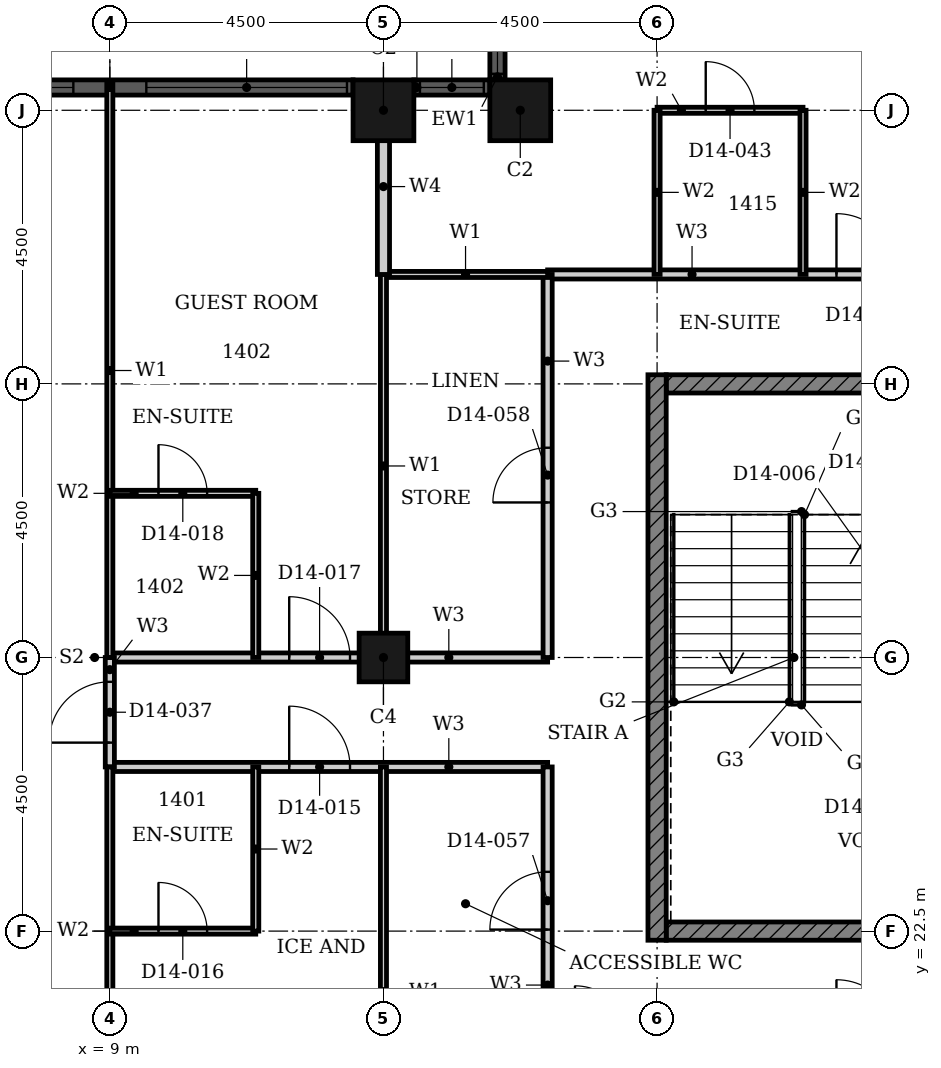
"""IFC4 building model, lengths in metres.
Left out: names, types, materials, properties, quantities, classifications, styles, units other than length and angle.
Written with IfcOpenShell. Run it as: python <this file> out.ifc"""

import sys

from ifc_helpers import new_model, si_unit, direction, frame, frame_2d, origin, origin_2d, place, context, subcontext, project, spatial, rectangle, hollow_rectangle, extrude, element, fill, save


model = new_model("IFC4")
c1 = context("Model", 3, precision=1e-05, world=origin(), true_north=direction((0.0, 1.0)))
c2 = subcontext(c1, "Body", "Model", "MODEL_VIEW")
j1 = project(units=[si_unit("LENGTHUNIT", "METRE"), si_unit("PLANEANGLEUNIT", "RADIAN")], contexts=[c1])
p1 = place(None, origin())
s1 = spatial("IfcSite", under=j1, at=p1, CompositionType="ELEMENT")
p2 = place(p1, origin())
s2 = spatial("IfcBuilding", under=s1, at=p2, CompositionType="ELEMENT")
p3 = place(p2, frame((0.0, 0.0, 63.6)))
s3 = spatial("IfcBuildingStorey", under=s2, at=p3, CompositionType="ELEMENT", Elevation=63.6)
for number, where, z_axis, x_axis in (
    (1, (15.75, 36.0, 0.0), (0.0, 0.0, 1.0), (1.0, 0.0, 0.0)),
    (2, (13.5, 36.0, 0.0), (0.0, 0.0, 1.0), (1.0, 0.0, 0.0)),
):
    element("IfcColumn", number, at=place(p3, frame(where, z_axis=z_axis, x_axis=x_axis)), inside=s3, PredefinedType="COLUMN", context=c2, shape_type="SweptSolid", body=[
        extrude(hollow_rectangle(XDim=1.0, YDim=1.0, WallThickness=0.032, at=origin_2d()), origin(), (0.0, 0.0, 1.0), 3.6),
    ])
p4 = place(p3, frame((13.5, 27.0, 0.0), z_axis=(0.0, 0.0, 1.0), x_axis=(1.0, 0.0, 0.0)))
e3 = element("IfcColumn", 3, at=p4, inside=s3, PredefinedType="COLUMN", context=c2, shape_type="SweptSolid", body=[
    extrude(hollow_rectangle(XDim=0.8, YDim=0.8, WallThickness=0.025, at=origin_2d()), origin(), (0.0, 0.0, 1.0), 3.6),
])
p5 = place(p3, frame((15.375, 37.75, 0.0), z_axis=(0.0, 0.0, 1.0), x_axis=(0.0, -1.0, 0.0)))
e4 = element("IfcWall", 4, at=p5, inside=s3, PredefinedType="SOLIDWALL", context=c2, shape_type="SweptSolid", body=[
    extrude(rectangle(XDim=1.25, YDim=0.25, at=frame_2d((0.625, 0.0))), origin(), (0.0, 0.0, 1.0), 3.6),
])
p6 = place(p5, frame((0.1, 0.0, 0.9)))
e5 = element("IfcOpeningElement", 5, at=p6, cuts=e4, PredefinedType="OPENING", context=c2, shape_type="SweptSolid", body=[
    extrude(rectangle(XDim=1.05, YDim=2.08, at=frame_2d((0.525, 1.04))), frame((0.0, 0.135, 0.0), z_axis=(0.0, -1.0, 0.0), x_axis=(1.0, 0.0, 0.0)), (0.0, 0.0, 1.0), 0.27),
])
p7 = place(p3, frame((15.25, 36.375, 0.0), z_axis=(0.0, 0.0, 1.0), x_axis=(-1.0, 0.0, 0.0)))
e6 = element("IfcWall", 6, at=p7, inside=s3, PredefinedType="SOLIDWALL", context=c2, shape_type="SweptSolid", body=[
    extrude(rectangle(XDim=1.25, YDim=0.25, at=frame_2d((0.625, 0.0))), origin(), (0.0, 0.0, 1.0), 3.6),
])
p8 = place(p7, frame((0.1, 0.0, 0.9)))
e7 = element("IfcOpeningElement", 7, at=p8, cuts=e6, PredefinedType="OPENING", context=c2, shape_type="SweptSolid", body=[
    extrude(rectangle(XDim=1.05, YDim=2.08, at=frame_2d((0.525, 1.04))), frame((0.0, 0.135, 0.0), z_axis=(0.0, -1.0, 0.0), x_axis=(1.0, 0.0, 0.0)), (0.0, 0.0, 1.0), 0.27),
])
p9 = place(p3, frame((13.0, 36.375, 0.0), z_axis=(0.0, 0.0, 1.0), x_axis=(-1.0, 0.0, 0.0)))
e8 = element("IfcWall", 8, at=p9, inside=s3, PredefinedType="SOLIDWALL", context=c2, shape_type="SweptSolid", body=[
    extrude(rectangle(XDim=8.0, YDim=0.25, at=frame_2d((4.0, 0.0))), origin(), (0.0, 0.0, 1.0), 3.6),
])
p10 = place(p9, frame((0.1, 0.0, 0.9)))
e9 = element("IfcOpeningElement", 9, at=p10, cuts=e8, PredefinedType="OPENING", context=c2, shape_type="SweptSolid", body=[
    extrude(rectangle(XDim=3.3, YDim=2.08, at=frame_2d((1.65, 1.04))), frame((0.0, 0.135, 0.0), z_axis=(0.0, -1.0, 0.0), x_axis=(1.0, 0.0, 0.0)), (0.0, 0.0, 1.0), 0.27),
])
p11 = place(p9, frame((4.6, 0.0, 0.9)))
e10 = element("IfcOpeningElement", 10, at=p11, cuts=e8, PredefinedType="OPENING", context=c2, shape_type="SweptSolid", body=[
    extrude(rectangle(XDim=3.3, YDim=2.08, at=frame_2d((1.65, 1.04))), frame((0.0, 0.135, 0.0), z_axis=(0.0, -1.0, 0.0), x_axis=(1.0, 0.0, 0.0)), (0.0, 0.0, 1.0), 0.27),
])
p12 = place(p3, frame((18.15, 22.5, 0.0), z_axis=(0.0, 0.0, 1.0), x_axis=(1.0, 0.0, 0.0)))
e11 = element("IfcWall", 11, at=p12, inside=s3, PredefinedType="SHEAR", context=c2, shape_type="SweptSolid", body=[
    extrude(rectangle(XDim=4.225, YDim=0.3, at=frame_2d((2.113, 0.0))), origin(), (0.0, 0.0, 1.0), 3.3),
])
p13 = place(p3, frame((18.15, 31.5, 0.0), z_axis=(0.0, 0.0, 1.0), x_axis=(1.0, 0.0, 0.0)))
e12 = element("IfcWall", 12, at=p13, inside=s3, PredefinedType="SHEAR", context=c2, shape_type="SweptSolid", body=[
    extrude(rectangle(XDim=6.797, YDim=0.3, at=frame_2d((3.398, 0.0))), origin(), (0.0, 0.0, 1.0), 3.3),
])
p14 = place(p13, frame((4.736, 0.0, 0.0)))
e13 = element("IfcOpeningElement", 13, at=p14, cuts=e12, PredefinedType="OPENING", context=c2, shape_type="SweptSolid", body=[
    extrude(rectangle(XDim=1.8, YDim=2.1, at=frame_2d((0.9, 1.05))), frame((0.0, 0.16, 0.0), z_axis=(0.0, -1.0, 0.0), x_axis=(1.0, 0.0, 0.0)), (0.0, 0.0, 1.0), 0.32),
])
p15 = place(p3, frame((18.0, 22.35, 0.0), z_axis=(0.0, 0.0, 1.0), x_axis=(0.0, 1.0, 0.0)))
e14 = element("IfcWall", 14, at=p15, inside=s3, PredefinedType="SHEAR", context=c2, shape_type="SweptSolid", body=[
    extrude(rectangle(XDim=9.3, YDim=0.3, at=frame_2d((4.65, 0.0))), origin(), (0.0, 0.0, 1.0), 3.3),
])
p16 = place(p3, frame((9.0, 25.2, 0.0), z_axis=(0.0, 0.0, 1.0), x_axis=(1.0, 0.0, 0.0)))
e15 = element("IfcWall", 15, at=p16, inside=s3, PredefinedType="PARTITIONING", context=c2, shape_type="SweptSolid", body=[
    extrude(rectangle(XDim=7.2, YDim=0.15, at=frame_2d((3.6, 0.0))), origin(), (0.0, 0.0, 1.0), 3.3),
])
p17 = place(p16, frame((2.95, 0.0, 0.0)))
e16 = element("IfcOpeningElement", 16, at=p17, cuts=e15, PredefinedType="OPENING", context=c2, shape_type="SweptSolid", body=[
    extrude(rectangle(XDim=1.0, YDim=2.1, at=frame_2d((0.5, 1.05))), frame((0.0, 0.085, 0.0), z_axis=(0.0, -1.0, 0.0), x_axis=(1.0, 0.0, 0.0)), (0.0, 0.0, 1.0), 0.17),
])
p18 = place(p3, frame((9.0, 27.0, 0.0), z_axis=(0.0, 0.0, 1.0), x_axis=(1.0, 0.0, 0.0)))
e17 = element("IfcWall", 17, at=p18, inside=s3, PredefinedType="PARTITIONING", context=c2, shape_type="SweptSolid", body=[
    extrude(rectangle(XDim=7.2, YDim=0.15, at=frame_2d((3.6, 0.0))), origin(), (0.0, 0.0, 1.0), 2.58),
])
p19 = place(p18, frame((2.95, 0.0, 0.0)))
e18 = element("IfcOpeningElement", 18, at=p19, cuts=e17, PredefinedType="OPENING", context=c2, shape_type="SweptSolid", body=[
    extrude(rectangle(XDim=1.0, YDim=2.1, at=frame_2d((0.5, 1.05))), frame((0.0, 0.085, 0.0), z_axis=(0.0, -1.0, 0.0), x_axis=(1.0, 0.0, 0.0)), (0.0, 0.0, 1.0), 0.17),
])
p20 = place(p3, frame((16.2, 33.3, 0.0), z_axis=(0.0, 0.0, 1.0), x_axis=(1.0, 0.0, 0.0)))
e19 = element("IfcWall", 19, at=p20, inside=s3, PredefinedType="PARTITIONING", context=c2, shape_type="SweptSolid", body=[
    extrude(rectangle(XDim=9.9, YDim=0.15, at=frame_2d((4.95, 0.0))), origin(), (0.0, 0.0, 1.0), 3.3),
])
p21 = place(p20, frame((4.75, 0.0, 0.0)))
e20 = element("IfcOpeningElement", 20, at=p21, cuts=e19, PredefinedType="OPENING", context=c2, shape_type="SweptSolid", body=[
    extrude(rectangle(XDim=1.0, YDim=2.1, at=frame_2d((0.5, 1.05))), frame((0.0, 0.085, 0.0), z_axis=(0.0, -1.0, 0.0), x_axis=(1.0, 0.0, 0.0)), (0.0, 0.0, 1.0), 0.17),
])
p22 = place(p20, frame((7.65, 0.0, 0.0)))
e21 = element("IfcOpeningElement", 21, at=p22, cuts=e19, PredefinedType="OPENING", context=c2, shape_type="SweptSolid", body=[
    extrude(rectangle(XDim=0.9, YDim=2.1, at=frame_2d((0.45, 1.05))), frame((0.0, 0.085, 0.0), z_axis=(0.0, -1.0, 0.0), x_axis=(1.0, 0.0, 0.0)), (0.0, 0.0, 1.0), 0.17),
])
p23 = place(p3, frame((16.2, 27.0, 0.0), z_axis=(0.0, 0.0, 1.0), x_axis=(0.0, 1.0, 0.0)))
e22 = element("IfcWall", 22, at=p23, inside=s3, PredefinedType="PARTITIONING", context=c2, shape_type="SweptSolid", body=[
    extrude(rectangle(XDim=6.3, YDim=0.15, at=frame_2d((3.15, 0.0))), origin(), (0.0, 0.0, 1.0), 3.3),
])
p24 = place(p23, frame((2.55, 0.0, 0.0)))
e23 = element("IfcOpeningElement", 23, at=p24, cuts=e22, PredefinedType="OPENING", context=c2, shape_type="SweptSolid", body=[
    extrude(rectangle(XDim=0.9, YDim=2.1, at=frame_2d((0.45, 1.05))), frame((0.0, 0.085, 0.0), z_axis=(0.0, -1.0, 0.0), x_axis=(1.0, 0.0, 0.0)), (0.0, 0.0, 1.0), 0.17),
])
p25 = place(p3, frame((16.2, 20.7, 0.0), z_axis=(0.0, 0.0, 1.0), x_axis=(0.0, 1.0, 0.0)))
e24 = element("IfcWall", 24, at=p25, inside=s3, PredefinedType="PARTITIONING", context=c2, shape_type="SweptSolid", body=[
    extrude(rectangle(XDim=4.5, YDim=0.15, at=frame_2d((2.25, 0.0))), origin(), (0.0, 0.0, 1.0), 3.3),
])
p26 = place(p25, frame((1.825, 0.0, 0.0)))
e25 = element("IfcOpeningElement", 25, at=p26, cuts=e24, PredefinedType="OPENING", context=c2, shape_type="SweptSolid", body=[
    extrude(rectangle(XDim=0.95, YDim=2.1, at=frame_2d((0.475, 1.05))), frame((0.0, 0.085, 0.0), z_axis=(0.0, -1.0, 0.0), x_axis=(1.0, 0.0, 0.0)), (0.0, 0.0, 1.0), 0.17),
])
p27 = place(p3, frame((9.0, 25.2, 0.0), z_axis=(0.0, 0.0, 1.0), x_axis=(0.0, 1.0, 0.0)))
e26 = element("IfcWall", 26, at=p27, inside=s3, PredefinedType="PARTITIONING", context=c2, shape_type="SweptSolid", body=[
    extrude(rectangle(XDim=1.8, YDim=0.15, at=frame_2d((0.9, 0.0))), origin(), (0.0, 0.0, 1.0), 3.3),
])
p28 = place(p27, frame((0.4, 0.0, 0.0)))
e27 = element("IfcOpeningElement", 27, at=p28, cuts=e26, PredefinedType="OPENING", context=c2, shape_type="SweptSolid", body=[
    extrude(rectangle(XDim=1.0, YDim=2.1, at=frame_2d((0.5, 1.05))), frame((0.0, 0.085, 0.0), z_axis=(0.0, -1.0, 0.0), x_axis=(1.0, 0.0, 0.0)), (0.0, 0.0, 1.0), 0.17),
])
p29 = place(p3, frame((13.5, 33.3, 0.0), z_axis=(0.0, 0.0, 1.0), x_axis=(1.0, 0.0, 0.0)))
e28 = element("IfcWall", 28, at=p29, inside=s3, PredefinedType="PARTITIONING", context=c2, shape_type="SweptSolid", body=[
    extrude(rectangle(XDim=2.7, YDim=0.1, at=frame_2d((1.35, 0.0))), origin(), (0.0, 0.0, 1.0), 3.3),
])
p30 = place(p3, frame((13.5, 27.0, 0.0), z_axis=(0.0, 0.0, 1.0), x_axis=(0.0, 1.0, 0.0)))
e29 = element("IfcWall", 29, at=p30, inside=s3, PredefinedType="PARTITIONING", context=c2, shape_type="SweptSolid", body=[
    extrude(rectangle(XDim=6.3, YDim=0.1, at=frame_2d((3.15, 0.0))), origin(), (0.0, 0.0, 1.0), 2.38),
])
p31 = place(p3, frame((13.5, 17.81, 0.0), z_axis=(0.0, 0.0, 1.0), x_axis=(0.0, 1.0, 0.0)))
e30 = element("IfcWall", 30, at=p31, inside=s3, PredefinedType="PARTITIONING", context=c2, shape_type="SweptSolid", body=[
    extrude(rectangle(XDim=7.39, YDim=0.1, at=frame_2d((3.695, 0.0))), origin(), (0.0, 0.0, 1.0), 2.38),
])
p32 = place(p3, frame((9.0, 27.0, 0.0), z_axis=(0.0, 0.0, 1.0), x_axis=(0.0, 1.0, 0.0)))
e31 = element("IfcWall", 31, at=p32, inside=s3, PredefinedType="PARTITIONING", context=c2, shape_type="SweptSolid", body=[
    extrude(rectangle(XDim=9.44, YDim=0.1, at=frame_2d((4.72, 0.0))), origin(), (0.0, 0.0, 1.0), 3.3),
])
p33 = place(p3, frame((9.0, 17.56, 0.0), z_axis=(0.0, 0.0, 1.0), x_axis=(0.0, 1.0, 0.0)))
e32 = element("IfcWall", 32, at=p33, inside=s3, PredefinedType="PARTITIONING", context=c2, shape_type="SweptSolid", body=[
    extrude(rectangle(XDim=7.64, YDim=0.1, at=frame_2d((3.82, 0.0))), origin(), (0.0, 0.0, 1.0), 3.3),
])
p34 = place(p3, frame((13.5, 33.3, 0.0), z_axis=(0.0, 0.0, 1.0), x_axis=(0.0, 1.0, 0.0)))
e33 = element("IfcWall", 33, at=p34, inside=s3, PredefinedType="PARTITIONING", context=c2, shape_type="SweptSolid", body=[
    extrude(rectangle(XDim=2.89, YDim=0.2, at=frame_2d((1.445, 0.0))), origin(), (0.0, 0.0, 1.0), 2.38),
])
p35 = place(p3, frame((9.0, 22.5, 0.0), z_axis=(0.0, 0.0, 1.0), x_axis=(1.0, 0.0, 0.0)))
e34 = element("IfcWall", 34, at=p35, inside=s3, PredefinedType="PARTITIONING", context=c2, shape_type="SweptSolid", body=[
    extrude(rectangle(XDim=2.4, YDim=0.1, at=frame_2d((1.2, 0.0))), origin(), (0.0, 0.0, 1.0), 2.58),
])
p36 = place(p35, frame((0.8, 0.0, 0.0)))
e35 = element("IfcOpeningElement", 35, at=p36, cuts=e34, PredefinedType="OPENING", context=c2, shape_type="SweptSolid", body=[
    extrude(rectangle(XDim=0.8, YDim=2.1, at=frame_2d((0.4, 1.05))), frame((0.0, 0.06, 0.0), z_axis=(0.0, -1.0, 0.0), x_axis=(1.0, 0.0, 0.0)), (0.0, 0.0, 1.0), 0.12),
])
p37 = place(p3, frame((9.0, 29.7, 0.0), z_axis=(0.0, 0.0, 1.0), x_axis=(1.0, 0.0, 0.0)))
e36 = element("IfcWall", 36, at=p37, inside=s3, PredefinedType="PARTITIONING", context=c2, shape_type="SweptSolid", body=[
    extrude(rectangle(XDim=2.4, YDim=0.1, at=frame_2d((1.2, 0.0))), origin(), (0.0, 0.0, 1.0), 3.3),
])
p38 = place(p37, frame((0.8, 0.0, 0.0)))
e37 = element("IfcOpeningElement", 37, at=p38, cuts=e36, PredefinedType="OPENING", context=c2, shape_type="SweptSolid", body=[
    extrude(rectangle(XDim=0.8, YDim=2.1, at=frame_2d((0.4, 1.05))), frame((0.0, 0.06, 0.0), z_axis=(0.0, -1.0, 0.0), x_axis=(1.0, 0.0, 0.0)), (0.0, 0.0, 1.0), 0.12),
])
p39 = place(p3, frame((18.0, 36.0, 0.0), z_axis=(0.0, 0.0, 1.0), x_axis=(1.0, 0.0, 0.0)))
e38 = element("IfcWall", 38, at=p39, inside=s3, PredefinedType="PARTITIONING", context=c2, shape_type="SweptSolid", body=[
    extrude(rectangle(XDim=2.4, YDim=0.1, at=frame_2d((1.2, 0.0))), origin(), (0.0, 0.0, 1.0), 3.3),
])
p40 = place(p39, frame((0.8, 0.0, 0.0)))
e39 = element("IfcOpeningElement", 39, at=p40, cuts=e38, PredefinedType="OPENING", context=c2, shape_type="SweptSolid", body=[
    extrude(rectangle(XDim=0.8, YDim=2.1, at=frame_2d((0.4, 1.05))), frame((0.0, 0.06, 0.0), z_axis=(0.0, -1.0, 0.0), x_axis=(1.0, 0.0, 0.0)), (0.0, 0.0, 1.0), 0.12),
])
for number, where, z_axis, x_axis in (
    (40, (11.4, 27.0, 0.0), (0.0, 0.0, 1.0), (0.0, 1.0, 0.0)),
    (41, (11.4, 22.5, 0.0), (0.0, 0.0, 1.0), (0.0, 1.0, 0.0)),
    (42, (18.0, 33.3, 0.0), (0.0, 0.0, 1.0), (0.0, 1.0, 0.0)),
    (43, (20.4, 33.3, 0.0), (0.0, 0.0, 1.0), (0.0, 1.0, 0.0)),
):
    element("IfcWall", number, at=place(p3, frame(where, z_axis=z_axis, x_axis=x_axis)), inside=s3, PredefinedType="PARTITIONING", context=c2, shape_type="SweptSolid", body=[
        extrude(rectangle(XDim=2.7, YDim=0.1, at=frame_2d((1.35, 0.0))), origin(), (0.0, 0.0, 1.0), 3.3),
    ])
p41 = place(p6, origin())
e44 = element("IfcWindow", 44, at=p41, inside=s3, PartitioningType="SINGLE_PANEL", PredefinedType="WINDOW", context=c2, shape_type="SweptSolid", body=[
    extrude(rectangle(XDim=1.05, YDim=2.08, at=frame_2d((0.525, 1.04))), frame((0.0, 0.03, 0.0), z_axis=(0.0, -1.0, 0.0), x_axis=(1.0, 0.0, 0.0)), (0.0, 0.0, 1.0), 0.06),
])
fill(e5, e44)
p42 = place(p8, origin())
e45 = element("IfcWindow", 45, at=p42, inside=s3, PartitioningType="SINGLE_PANEL", PredefinedType="WINDOW", context=c2, shape_type="SweptSolid", body=[
    extrude(rectangle(XDim=1.05, YDim=2.08, at=frame_2d((0.525, 1.04))), frame((0.0, 0.03, 0.0), z_axis=(0.0, -1.0, 0.0), x_axis=(1.0, 0.0, 0.0)), (0.0, 0.0, 1.0), 0.06),
])
fill(e7, e45)
p43 = place(p10, origin())
e46 = element("IfcWindow", 46, at=p43, inside=s3, PartitioningType="SINGLE_PANEL", PredefinedType="WINDOW", context=c2, shape_type="SweptSolid", body=[
    extrude(rectangle(XDim=3.3, YDim=2.08, at=frame_2d((1.65, 1.04))), frame((0.0, 0.03, 0.0), z_axis=(0.0, -1.0, 0.0), x_axis=(1.0, 0.0, 0.0)), (0.0, 0.0, 1.0), 0.06),
])
fill(e9, e46)
p44 = place(p11, origin())
e47 = element("IfcWindow", 47, at=p44, inside=s3, PartitioningType="SINGLE_PANEL", PredefinedType="WINDOW", context=c2, shape_type="SweptSolid", body=[
    extrude(rectangle(XDim=3.3, YDim=2.08, at=frame_2d((1.65, 1.04))), frame((0.0, 0.03, 0.0), z_axis=(0.0, -1.0, 0.0), x_axis=(1.0, 0.0, 0.0)), (0.0, 0.0, 1.0), 0.06),
])
fill(e10, e47)
p45 = place(p17, origin())
e48 = element("IfcDoor", 48, at=p45, inside=s3, OperationType="SINGLE_SWING_RIGHT", PredefinedType="DOOR", context=c2, shape_type="SweptSolid", body=[
    extrude(rectangle(XDim=1.0, YDim=2.1, at=frame_2d((0.5, 1.05))), frame((0.0, 0.025, 0.0), z_axis=(0.0, -1.0, 0.0), x_axis=(1.0, 0.0, 0.0)), (0.0, 0.0, 1.0), 0.05),
])
fill(e16, e48)
p46 = place(p36, origin())
e49 = element("IfcDoor", 49, at=p46, inside=s3, OperationType="SINGLE_SWING_LEFT", PredefinedType="DOOR", context=c2, shape_type="SweptSolid", body=[
    extrude(rectangle(XDim=0.8, YDim=2.1, at=frame_2d((0.4, 1.05))), frame((0.0, 0.025, 0.0), z_axis=(0.0, -1.0, 0.0), x_axis=(1.0, 0.0, 0.0)), (0.0, 0.0, 1.0), 0.05),
])
fill(e35, e49)
p47 = place(p19, origin())
e50 = element("IfcDoor", 50, at=p47, inside=s3, OperationType="SINGLE_SWING_RIGHT", PredefinedType="DOOR", context=c2, shape_type="SweptSolid", body=[
    extrude(rectangle(XDim=1.0, YDim=2.1, at=frame_2d((0.5, 1.05))), frame((0.0, 0.025, 0.0), z_axis=(0.0, -1.0, 0.0), x_axis=(1.0, 0.0, 0.0)), (0.0, 0.0, 1.0), 0.05),
])
fill(e18, e50)
p48 = place(p38, origin())
e51 = element("IfcDoor", 51, at=p48, inside=s3, OperationType="SINGLE_SWING_LEFT", PredefinedType="DOOR", context=c2, shape_type="SweptSolid", body=[
    extrude(rectangle(XDim=0.8, YDim=2.1, at=frame_2d((0.4, 1.05))), frame((0.0, 0.025, 0.0), z_axis=(0.0, -1.0, 0.0), x_axis=(1.0, 0.0, 0.0)), (0.0, 0.0, 1.0), 0.05),
])
fill(e37, e51)
p49 = place(p28, origin())
e52 = element("IfcDoor", 52, at=p49, inside=s3, OperationType="SINGLE_SWING_RIGHT", PredefinedType="DOOR", context=c2, shape_type="SweptSolid", body=[
    extrude(rectangle(XDim=1.0, YDim=2.1, at=frame_2d((0.5, 1.05))), frame((0.0, 0.025, 0.0), z_axis=(0.0, -1.0, 0.0), x_axis=(1.0, 0.0, 0.0)), (0.0, 0.0, 1.0), 0.05),
])
fill(e27, e52)
p50 = place(p21, origin())
e53 = element("IfcDoor", 53, at=p50, inside=s3, OperationType="SINGLE_SWING_RIGHT", PredefinedType="DOOR", context=c2, shape_type="SweptSolid", body=[
    extrude(rectangle(XDim=1.0, YDim=2.1, at=frame_2d((0.5, 1.05))), frame((0.0, 0.025, 0.0), z_axis=(0.0, -1.0, 0.0), x_axis=(1.0, 0.0, 0.0)), (0.0, 0.0, 1.0), 0.05),
])
fill(e20, e53)
p51 = place(p40, origin())
e54 = element("IfcDoor", 54, at=p51, inside=s3, OperationType="SINGLE_SWING_RIGHT", PredefinedType="DOOR", context=c2, shape_type="SweptSolid", body=[
    extrude(rectangle(XDim=0.8, YDim=2.1, at=frame_2d((0.4, 1.05))), frame((0.0, 0.025, 0.0), z_axis=(0.0, -1.0, 0.0), x_axis=(1.0, 0.0, 0.0)), (0.0, 0.0, 1.0), 0.05),
])
fill(e39, e54)
p52 = place(p26, origin())
e55 = element("IfcDoor", 55, at=p52, inside=s3, OperationType="SINGLE_SWING_RIGHT", PredefinedType="DOOR", context=c2, shape_type="SweptSolid", body=[
    extrude(rectangle(XDim=0.95, YDim=2.1, at=frame_2d((0.475, 1.05))), frame((0.0, 0.025, 0.0), z_axis=(0.0, -1.0, 0.0), x_axis=(1.0, 0.0, 0.0)), (0.0, 0.0, 1.0), 0.05),
])
fill(e25, e55)
p53 = place(p24, origin())
e56 = element("IfcDoor", 56, at=p53, inside=s3, OperationType="SINGLE_SWING_LEFT", PredefinedType="DOOR", context=c2, shape_type="SweptSolid", body=[
    extrude(rectangle(XDim=0.9, YDim=2.1, at=frame_2d((0.45, 1.05))), frame((0.0, 0.025, 0.0), z_axis=(0.0, -1.0, 0.0), x_axis=(1.0, 0.0, 0.0)), (0.0, 0.0, 1.0), 0.05),
])
fill(e23, e56)
save(model, sys.argv[1])
